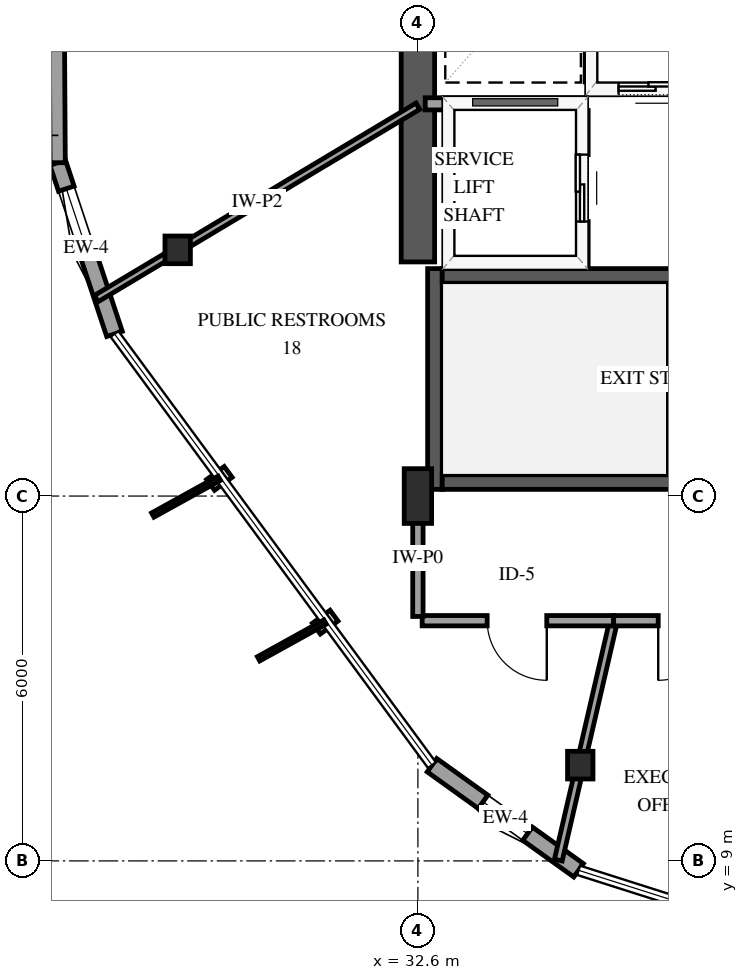
"""IFC4 building model, lengths in metres.
Left out: names, types, materials, properties, quantities, classifications, styles, units other than length and angle.
Written with IfcOpenShell. Run it as: python <this file> out.ifc"""

import sys

from ifc_helpers import new_model, si_unit, direction, frame, frame_2d, origin, origin_2d, place, context, subcontext, project, spatial, rectangle, i_section, extrude, element, fill, save


model = new_model("IFC4")
c1 = context("Model", 3, precision=1e-05, world=origin(), true_north=direction((0.0, 1.0)))
c2 = subcontext(c1, "Body", "Model", "MODEL_VIEW")
j1 = project(units=[si_unit("LENGTHUNIT", "METRE"), si_unit("PLANEANGLEUNIT", "RADIAN")], contexts=[c1])
p1 = place(None, origin())
s1 = spatial("IfcSite", under=j1, at=p1, CompositionType="ELEMENT")
p2 = place(p1, origin())
s2 = spatial("IfcBuilding", under=s1, at=p2, CompositionType="ELEMENT")
p3 = place(p2, frame((0.0, 0.0, 99.1)))
s3 = spatial("IfcBuildingStorey", under=s2, at=p3, CompositionType="ELEMENT", Elevation=99.1)
p4 = place(p3, frame((32.88, 15.11, 0.0), z_axis=(0.0, 0.0, 1.0), x_axis=(0.0, 1.0, 0.0)))
e1 = element("IfcWall", 1, at=p4, inside=s3, PredefinedType="SHEAR", context=c2, shape_type="SweptSolid", body=[
    extrude(rectangle(XDim=3.63, YDim=0.24, at=frame_2d((1.815, 0.0))), origin(), (0.0, 0.0, 1.0), 3.9),
])
for number, where, z_axis, x_axis in (
    (2, (33.0, 15.23, 0.0), (0.0, 0.0, 1.0), (1.0, 0.0, 0.0)),
    (3, (33.0, 18.62, 0.0), (0.0, 0.0, 1.0), (1.0, 0.0, 0.0)),
):
    element("IfcWall", number, at=place(p3, frame(where, z_axis=z_axis, x_axis=x_axis)), inside=s3, PredefinedType="SHEAR", context=c2, shape_type="SweptSolid", body=[
        extrude(rectangle(XDim=8.0, YDim=0.24, at=frame_2d((4.0, 0.0))), origin(), (0.0, 0.0, 1.0), 3.9),
    ])
p5 = place(p3, frame((32.6, 18.85, 0.0), z_axis=(0.0, 0.0, 1.0), x_axis=(0.0, 1.0, 0.0)))
e4 = element("IfcWall", 4, at=p5, inside=s3, PredefinedType="SHEAR", context=c2, shape_type="SweptSolid", body=[
    extrude(rectangle(XDim=12.3, YDim=0.55, at=frame_2d((6.15, 0.0))), origin(), (0.0, 0.0, 1.0), 3.9),
])
p6 = place(p3, frame((32.6, 15.0, 0.0), z_axis=(0.0, 0.0, 1.0), x_axis=(1.0, 0.0, 0.0)))
e5 = element("IfcColumn", 5, at=p6, inside=s3, PredefinedType="PILASTER", context=c2, shape_type="SweptSolid", body=[
    extrude(rectangle(XDim=0.45, YDim=0.9, at=origin_2d()), origin(), (0.0, 0.0, 1.0), 3.9),
])
for number, where, z_axis, x_axis in (
    (6, (28.649, 19.049, 0.0), (0.0, 0.0, 1.0), (1.0, 0.0, 0.0)),
    (7, (35.27, 10.575, 0.0), (0.0, 0.0, 1.0), (1.0, 0.0, 0.0)),
):
    element("IfcColumn", number, at=place(p3, frame(where, z_axis=z_axis, x_axis=x_axis)), inside=s3, PredefinedType="COLUMN", context=c2, shape_type="SweptSolid", body=[
        extrude(i_section(OverallWidth=0.418, OverallDepth=0.455, WebThickness=0.042, FlangeThickness=0.068, FilletRadius=0.038, at=origin_2d()), origin(), (0.0, 0.0, 1.0), 3.9),
    ])
p7 = place(p3, frame((26.676, 20.481, 0.0), z_axis=(0.0, 0.0, 1.0), x_axis=(0.314968272773, -0.94910220058, 0.0)))
e8 = element("IfcWall", 8, at=p7, inside=s3, PredefinedType="SOLIDWALL", context=c2, shape_type="SweptSolid", body=[
    extrude(rectangle(XDim=2.966, YDim=0.27, at=frame_2d((1.483, 0.0))), origin(), (0.0, 0.0, 1.0), 2.979),
])
p8 = place(p7, frame((0.45, 0.0, 0.75)))
e9 = element("IfcOpeningElement", 9, at=p8, cuts=e8, PredefinedType="OPENING", context=c2, shape_type="SweptSolid", body=[
    extrude(rectangle(XDim=0.9, YDim=1.5, at=frame_2d((0.45, 0.75))), frame((0.0, 0.145, 0.0), z_axis=(0.0, -1.0, 0.0), x_axis=(1.0, 0.0, 0.0)), (0.0, 0.0, 1.0), 0.29),
])
p9 = place(p3, frame((26.621, 29.288, 0.0), z_axis=(0.0, 0.0, 1.0), x_axis=(0.006293019465, -0.999980198757, 0.0)))
e10 = element("IfcWall", 10, at=p9, inside=s3, PredefinedType="SOLIDWALL", context=c2, shape_type="SweptSolid", body=[
    extrude(rectangle(XDim=8.807, YDim=0.25, at=frame_2d((4.403, 0.0))), origin(), (0.0, 0.0, 1.0), 2.979),
])
p10 = place(p9, frame((3.903, 0.0, 0.0)))
e11 = element("IfcOpeningElement", 11, at=p10, cuts=e10, PredefinedType="OPENING", context=c2, shape_type="SweptSolid", body=[
    extrude(rectangle(XDim=1.05, YDim=2.15, at=frame_2d((0.525, 1.075))), frame((0.0, 0.135, 0.0), z_axis=(0.0, -1.0, 0.0), x_axis=(1.0, 0.0, 0.0)), (0.0, 0.0, 1.0), 0.27),
])
p11 = place(p9, frame((0.44, 0.0, 0.72)))
e12 = element("IfcOpeningElement", 12, at=p11, cuts=e10, PredefinedType="OPENING", context=c2, shape_type="SweptSolid", body=[
    extrude(rectangle(XDim=1.35, YDim=1.65, at=frame_2d((0.675, 0.825))), frame((0.0, 0.135, 0.0), z_axis=(0.0, -1.0, 0.0), x_axis=(1.0, 0.0, 0.0)), (0.0, 0.0, 1.0), 0.27),
])
p12 = place(p9, frame((5.593, 0.0, 0.72)))
e13 = element("IfcOpeningElement", 13, at=p12, cuts=e10, PredefinedType="OPENING", context=c2, shape_type="SweptSolid", body=[
    extrude(rectangle(XDim=1.35, YDim=1.65, at=frame_2d((0.675, 0.825))), frame((0.0, 0.135, 0.0), z_axis=(0.0, -1.0, 0.0), x_axis=(1.0, 0.0, 0.0)), (0.0, 0.0, 1.0), 0.27),
])
p13 = place(p3, frame((32.832, 10.574, 0.0), z_axis=(0.0, 0.0, 1.0), x_axis=(0.81270345811, -0.582677517308, 0.0)))
e14 = element("IfcWall", 14, at=p13, inside=s3, PredefinedType="SOLIDWALL", context=c2, shape_type="SweptSolid", body=[
    extrude(rectangle(XDim=2.967, YDim=0.27, at=frame_2d((1.483, 0.0))), origin(), (0.0, 0.0, 1.0), 2.979),
])
p14 = place(p13, frame((1.033, 0.0, 0.75)))
e15 = element("IfcOpeningElement", 15, at=p14, cuts=e14, PredefinedType="OPENING", context=c2, shape_type="SweptSolid", body=[
    extrude(rectangle(XDim=0.9, YDim=1.5, at=frame_2d((0.45, 0.75))), frame((0.0, 0.145, 0.0), z_axis=(0.0, -1.0, 0.0), x_axis=(1.0, 0.0, 0.0)), (0.0, 0.0, 1.0), 0.29),
])
p15 = place(p3, frame((35.45, 21.7, 0.0), z_axis=(0.0, 0.0, 1.0), x_axis=(1.0, 0.0, 0.0)))
e16 = element("IfcWall", 16, at=p15, inside=s3, PredefinedType="SOLIDWALL", context=c2, shape_type="SweptSolid", body=[
    extrude(rectangle(XDim=2.0, YDim=0.2, at=frame_2d((1.0, 0.0))), origin(), (0.0, 0.0, 1.0), 3.6),
])
p16 = place(p15, frame((0.45, 0.0, 0.0)))
e17 = element("IfcOpeningElement", 17, at=p16, cuts=e16, PredefinedType="OPENING", context=c2, shape_type="SweptSolid", body=[
    extrude(rectangle(XDim=1.1, YDim=2.15, at=frame_2d((0.55, 1.075))), frame((0.0, 0.11, 0.0), z_axis=(0.0, -1.0, 0.0), x_axis=(1.0, 0.0, 0.0)), (0.0, 0.0, 1.0), 0.22),
])
p17 = place(p3, frame((35.45, 21.81, 0.0), z_axis=(0.0, 0.0, 1.0), x_axis=(0.0, 1.0, 0.0)))
e18 = element("IfcWall", 18, at=p17, inside=s3, PredefinedType="SOLIDWALL", context=c2, shape_type="SweptSolid", body=[
    extrude(rectangle(XDim=2.38, YDim=0.2, at=frame_2d((1.19, 0.0))), origin(), (0.0, 0.0, 1.0), 3.6),
])
p18 = place(p3, frame((32.72, 21.45, 0.0), z_axis=(0.0, 0.0, 1.0), x_axis=(1.0, 0.0, 0.0)))
e19 = element("IfcWall", 19, at=p18, inside=s3, PredefinedType="SOLIDWALL", context=c2, shape_type="SweptSolid", body=[
    extrude(rectangle(XDim=2.58, YDim=0.2, at=frame_2d((1.29, 0.0))), origin(), (0.0, 0.0, 1.0), 3.6),
])
p19 = place(p3, frame((35.3, 18.79, 0.0), z_axis=(0.0, 0.0, 1.0), x_axis=(0.0, 1.0, 0.0)))
e20 = element("IfcWall", 20, at=p19, inside=s3, PredefinedType="SOLIDWALL", context=c2, shape_type="SweptSolid", body=[
    extrude(rectangle(XDim=2.55, YDim=0.2, at=frame_2d((1.275, 0.0))), origin(), (0.0, 0.0, 1.0), 3.6),
])
p20 = place(p19, frame((0.725, 0.0, 0.0)))
e21 = element("IfcOpeningElement", 21, at=p20, cuts=e20, PredefinedType="OPENING", context=c2, shape_type="SweptSolid", body=[
    extrude(rectangle(XDim=1.1, YDim=2.15, at=frame_2d((0.55, 1.075))), frame((0.0, 0.11, 0.0), z_axis=(0.0, -1.0, 0.0), x_axis=(1.0, 0.0, 0.0)), (0.0, 0.0, 1.0), 0.22),
])
p21 = place(p3, frame((32.6, 21.411, 0.0), z_axis=(0.0, 0.0, 1.0), x_axis=(-0.858222476584, -0.513277878625, 0.0)))
e22 = element("IfcWall", 22, at=p21, inside=s3, PredefinedType="PARTITIONING", context=c2, shape_type="SweptSolid", body=[
    extrude(rectangle(XDim=6.164, YDim=0.12, at=frame_2d((3.082, 0.0))), origin(), (0.0, 0.0, 1.0), 3.6),
])
p22 = place(p3, frame((35.819, 12.95, 0.0), z_axis=(0.0, 0.0, 1.0), x_axis=(-0.225238970117, -0.974303549383, 0.0)))
e23 = element("IfcWall", 23, at=p22, inside=s3, PredefinedType="PARTITIONING", context=c2, shape_type="SweptSolid", body=[
    extrude(rectangle(XDim=4.041, YDim=0.13, at=frame_2d((2.021, 0.0))), origin(), (0.0, 0.0, 1.0), 2.895),
])
p23 = place(p3, frame((35.819, 12.95, 0.0), z_axis=(0.0, 0.0, 1.0), x_axis=(-1.0, 0.0, 0.0)))
e24 = element("IfcWall", 24, at=p23, inside=s3, PredefinedType="PARTITIONING", context=c2, shape_type="SweptSolid", body=[
    extrude(rectangle(XDim=3.149, YDim=0.17, at=frame_2d((1.575, 0.0))), origin(), (0.0, 0.0, 1.0), 3.6),
])
p24 = place(p23, frame((1.1, 0.0, 0.0)))
e25 = element("IfcOpeningElement", 25, at=p24, cuts=e24, PredefinedType="OPENING", context=c2, shape_type="SweptSolid", body=[
    extrude(rectangle(XDim=0.98, YDim=2.15, at=frame_2d((0.49, 1.075))), frame((0.0, 0.095, 0.0), z_axis=(0.0, -1.0, 0.0), x_axis=(1.0, 0.0, 0.0)), (0.0, 0.0, 1.0), 0.19),
])
p25 = place(p3, frame((38.294, 12.95, 0.0), z_axis=(0.0, 0.0, 1.0), x_axis=(-1.0, 0.0, 0.0)))
e26 = element("IfcWall", 26, at=p25, inside=s3, PredefinedType="PARTITIONING", context=c2, shape_type="SweptSolid", body=[
    extrude(rectangle(XDim=2.475, YDim=0.17, at=frame_2d((1.237, 0.0))), origin(), (0.0, 0.0, 1.0), 3.6),
])
p26 = place(p25, frame((0.762, 0.0, 0.0)))
e27 = element("IfcOpeningElement", 27, at=p26, cuts=e26, PredefinedType="OPENING", context=c2, shape_type="SweptSolid", body=[
    extrude(rectangle(XDim=0.98, YDim=2.15, at=frame_2d((0.49, 1.075))), frame((0.0, 0.095, 0.0), z_axis=(0.0, -1.0, 0.0), x_axis=(1.0, 0.0, 0.0)), (0.0, 0.0, 1.0), 0.19),
])
p27 = place(p3, frame((32.6, 13.02, 0.0), z_axis=(0.0, 0.0, 1.0), x_axis=(0.0, 1.0, 0.0)))
e28 = element("IfcWall", 28, at=p27, inside=s3, PredefinedType="PARTITIONING", context=c2, shape_type="SweptSolid", body=[
    extrude(rectangle(XDim=1.91, YDim=0.17, at=frame_2d((0.955, 0.0))), origin(), (0.0, 0.0, 1.0), 3.6),
])
p28 = place(p8, origin())
e29 = element("IfcWindow", 29, at=p28, inside=s3, PartitioningType="SINGLE_PANEL", PredefinedType="WINDOW", context=c2, shape_type="SweptSolid", body=[
    extrude(rectangle(XDim=0.9, YDim=1.5, at=frame_2d((0.45, 0.75))), frame((0.0, 0.03, 0.0), z_axis=(0.0, -1.0, 0.0), x_axis=(1.0, 0.0, 0.0)), (0.0, 0.0, 1.0), 0.06),
])
fill(e9, e29)
p29 = place(p14, origin())
e30 = element("IfcWindow", 30, at=p29, inside=s3, PartitioningType="SINGLE_PANEL", PredefinedType="WINDOW", context=c2, shape_type="SweptSolid", body=[
    extrude(rectangle(XDim=0.9, YDim=1.5, at=frame_2d((0.45, 0.75))), frame((0.0, 0.03, 0.0), z_axis=(0.0, -1.0, 0.0), x_axis=(1.0, 0.0, 0.0)), (0.0, 0.0, 1.0), 0.06),
])
fill(e15, e30)
p30 = place(p16, origin())
e31 = element("IfcDoor", 31, at=p30, inside=s3, OperationType="SLIDING_TO_LEFT", PredefinedType="DOOR", context=c2, shape_type="SweptSolid", body=[
    extrude(rectangle(XDim=1.1, YDim=2.15, at=frame_2d((0.55, 1.075))), frame((0.0, 0.025, 0.0), z_axis=(0.0, -1.0, 0.0), x_axis=(1.0, 0.0, 0.0)), (0.0, 0.0, 1.0), 0.05),
])
fill(e17, e31)
p31 = place(p20, origin())
e32 = element("IfcDoor", 32, at=p31, inside=s3, OperationType="SLIDING_TO_LEFT", PredefinedType="DOOR", context=c2, shape_type="SweptSolid", body=[
    extrude(rectangle(XDim=1.1, YDim=2.15, at=frame_2d((0.55, 1.075))), frame((0.0, 0.025, 0.0), z_axis=(0.0, -1.0, 0.0), x_axis=(1.0, 0.0, 0.0)), (0.0, 0.0, 1.0), 0.05),
])
fill(e21, e32)
p32 = place(p24, origin())
e33 = element("IfcDoor", 33, at=p32, inside=s3, OperationType="SINGLE_SWING_LEFT", PredefinedType="DOOR", context=c2, shape_type="SweptSolid", body=[
    extrude(rectangle(XDim=0.98, YDim=2.15, at=frame_2d((0.49, 1.075))), frame((0.0, 0.025, 0.0), z_axis=(0.0, -1.0, 0.0), x_axis=(1.0, 0.0, 0.0)), (0.0, 0.0, 1.0), 0.05),
])
fill(e25, e33)
p33 = place(p26, origin())
e34 = element("IfcDoor", 34, at=p33, inside=s3, OperationType="SINGLE_SWING_RIGHT", PredefinedType="DOOR", context=c2, shape_type="SweptSolid", body=[
    extrude(rectangle(XDim=0.98, YDim=2.15, at=frame_2d((0.49, 1.075))), frame((0.0, 0.025, 0.0), z_axis=(0.0, -1.0, 0.0), x_axis=(1.0, 0.0, 0.0)), (0.0, 0.0, 1.0), 0.05),
])
fill(e27, e34)
save(model, sys.argv[1])
